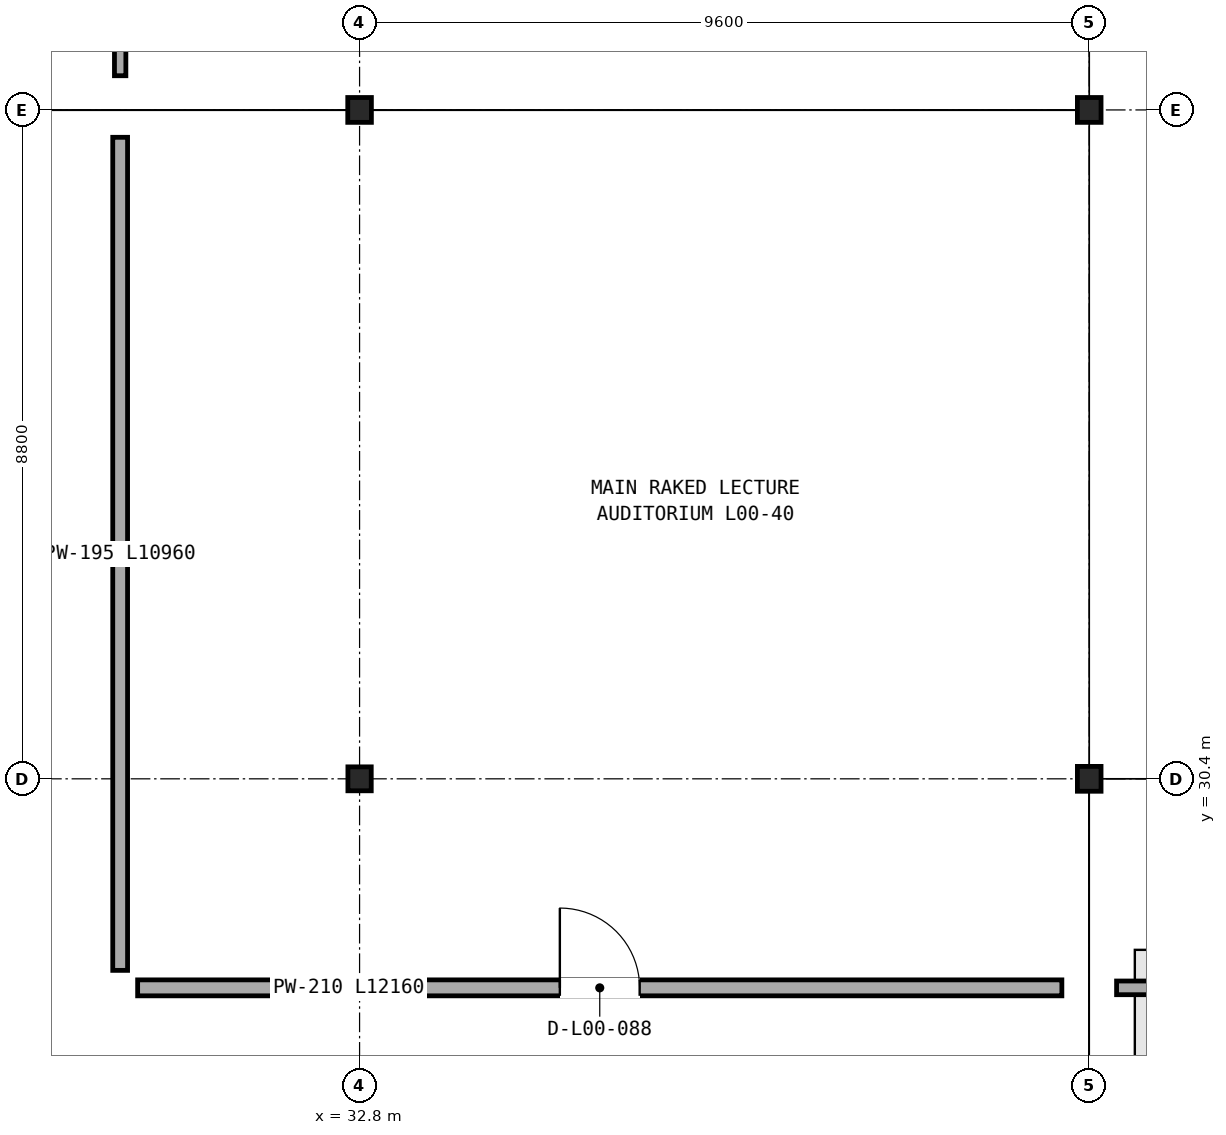
"""IFC4 building model, lengths in metres.
Left out: names, types, materials, properties, quantities, classifications, styles, units other than length and angle.
Written with IfcOpenShell. Run it as: python <this file> out.ifc"""

import sys

from ifc_helpers import new_model, si_unit, direction, frame, frame_2d, origin, origin_2d, place, context, subcontext, project, spatial, rectangle, i_section, extrude, element, fill, save


model = new_model("IFC4")
c1 = context("Model", 3, precision=1e-05, world=origin(), true_north=direction((0.0, 1.0)))
c2 = subcontext(c1, "Body", "Model", "MODEL_VIEW")
j1 = project(units=[si_unit("LENGTHUNIT", "METRE"), si_unit("PLANEANGLEUNIT", "RADIAN")], contexts=[c1])
p1 = place(None, origin())
s1 = spatial("IfcSite", under=j1, at=p1, CompositionType="ELEMENT")
p2 = place(p1, origin())
s2 = spatial("IfcBuilding", under=s1, at=p2, CompositionType="ELEMENT")
p3 = place(p2, origin())
s3 = spatial("IfcBuildingStorey", under=s2, at=p3, CompositionType="ELEMENT", Elevation=0.0)
p4 = place(p3, frame((32.8, 30.4, 0.0), z_axis=(0.0, 0.0, 1.0), x_axis=(1.0, 0.0, 0.0)))
e1 = element("IfcColumn", 1, at=p4, inside=s3, PredefinedType="COLUMN", context=c2, shape_type="SweptSolid", body=[
    extrude(i_section(OverallWidth=0.307, OverallDepth=0.315, WebThickness=0.012, FlangeThickness=0.019, FilletRadius=0.017, at=origin_2d()), origin(), (0.0, 0.0, 1.0), 5.6),
])
for number, where, z_axis, x_axis in (
    (2, (32.8, 39.2, 0.0), (0.0, 0.0, 1.0), (1.0, 0.0, 0.0)),
    (3, (42.4, 30.4, 0.0), (0.0, 0.0, 1.0), (1.0, 0.0, 0.0)),
    (4, (42.4, 39.2, 0.0), (0.0, 0.0, 1.0), (1.0, 0.0, 0.0)),
):
    element("IfcColumn", number, at=place(p3, frame(where, z_axis=z_axis, x_axis=x_axis)), inside=s3, PredefinedType="COLUMN", context=c2, shape_type="SweptSolid", body=[
        extrude(i_section(OverallWidth=0.311, OverallDepth=0.327, WebThickness=0.016, FlangeThickness=0.025, FilletRadius=0.017, at=origin_2d()), origin(), (0.0, 0.0, 1.0), 5.6),
    ])
p5 = place(p3, frame((61.93, 27.65, 0.0), z_axis=(0.0, 0.0, 1.0), x_axis=(-1.0, 0.0, 0.0)))
e5 = element("IfcWall", 5, at=p5, inside=s3, PredefinedType="PARTITIONING", context=c2, shape_type="SweptSolid", body=[
    extrude(rectangle(XDim=19.17, YDim=0.18, at=frame_2d((9.585, 0.0))), origin(), (0.0, 0.0, 1.0), 5.23),
])
p6 = place(p3, frame((29.65, 39.65, 0.0), z_axis=(0.0, 0.0, 1.0), x_axis=(0.0, 1.0, 0.0)))
e6 = element("IfcWall", 6, at=p6, inside=s3, PredefinedType="PARTITIONING", context=c2, shape_type="SweptSolid", body=[
    extrude(rectangle(XDim=11.27, YDim=0.15, at=frame_2d((5.635, 0.0))), origin(), (0.0, 0.0, 1.0), 4.708),
])
p7 = place(p3, frame((42.04, 27.65, 0.0), z_axis=(0.0, 0.0, 1.0), x_axis=(-1.0, 0.0, 0.0)))
e7 = element("IfcWall", 7, at=p7, inside=s3, PredefinedType="PARTITIONING", context=c2, shape_type="SweptSolid", body=[
    extrude(rectangle(XDim=12.16, YDim=0.21, at=frame_2d((6.08, 0.0))), origin(), (0.0, 0.0, 1.0), 4.717),
])
p8 = place(p7, frame((5.555, 0.0, 0.0)))
e8 = element("IfcOpeningElement", 8, at=p8, cuts=e7, PredefinedType="OPENING", context=c2, shape_type="SweptSolid", body=[
    extrude(rectangle(XDim=1.05, YDim=2.15, at=frame_2d((0.525, 1.075))), frame((0.0, 0.115, 0.0), z_axis=(0.0, -1.0, 0.0), x_axis=(1.0, 0.0, 0.0)), (0.0, 0.0, 1.0), 0.23),
])
p9 = place(p3, frame((29.65, 27.88, 0.0), z_axis=(0.0, 0.0, 1.0), x_axis=(0.0, 1.0, 0.0)))
e9 = element("IfcWall", 9, at=p9, inside=s3, PredefinedType="PARTITIONING", context=c2, shape_type="SweptSolid", body=[
    extrude(rectangle(XDim=10.96, YDim=0.195, at=frame_2d((5.48, 0.0))), origin(), (0.0, 0.0, 1.0), 4.638),
])
p10 = place(p8, frame((1.05, 0.0, 0.0), z_axis=(0.0, 0.0, 1.0), x_axis=(-1.0, 0.0, 0.0)))
e10 = element("IfcDoor", 10, at=p10, inside=s3, OperationType="SINGLE_SWING_RIGHT", PredefinedType="DOOR", context=c2, shape_type="SweptSolid", body=[
    extrude(rectangle(XDim=1.05, YDim=2.15, at=frame_2d((0.525, 1.075))), frame((0.0, 0.025, 0.0), z_axis=(0.0, -1.0, 0.0), x_axis=(1.0, 0.0, 0.0)), (0.0, 0.0, 1.0), 0.05),
])
fill(e8, e10)
save(model, sys.argv[1])
